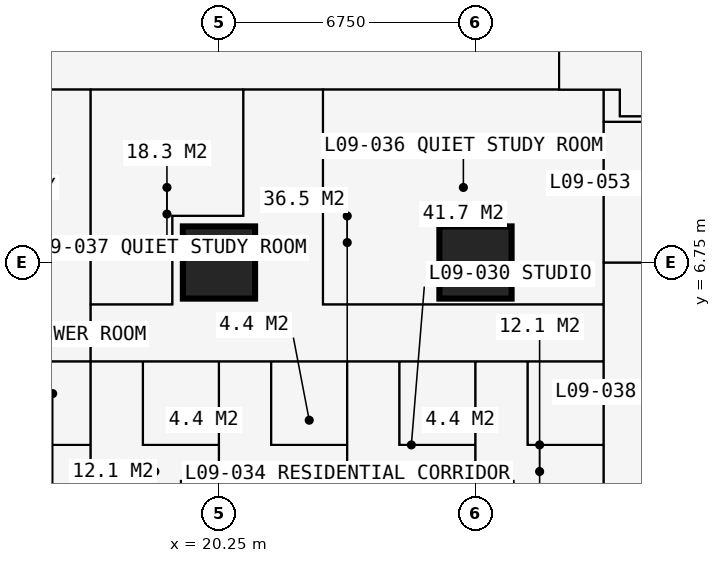
"""IFC4 building model, lengths in metres.
Left out: names, types, materials, properties, quantities, classifications, styles, units other than length and angle.
Written with IfcOpenShell. Run it as: python <this file> out.ifc"""

import sys

from ifc_helpers import new_model, si_unit, direction, frame, frame_2d, origin, origin_2d, place, context, subcontext, project, spatial, rectangle, extrude, element, fill, save


model = new_model("IFC4")
c1 = context("Model", 3, precision=1e-05, world=origin(), true_north=direction((0.0, 1.0)))
c2 = subcontext(c1, "Body", "Model", "MODEL_VIEW")
j1 = project(units=[si_unit("LENGTHUNIT", "METRE"), si_unit("PLANEANGLEUNIT", "RADIAN")], contexts=[c1])
p1 = place(None, origin())
s1 = spatial("IfcSite", under=j1, at=p1, CompositionType="ELEMENT")
p2 = place(p1, origin())
s2 = spatial("IfcBuilding", under=s1, at=p2, CompositionType="ELEMENT")
p3 = place(p2, frame((0.0, 0.0, 36.0)))
s3 = spatial("IfcBuildingStorey", under=s2, at=p3, CompositionType="ELEMENT", Elevation=36.0)
for number, where, z_axis, x_axis in (
    (1, (20.25, 6.75, 0.0), (0.0, 0.0, 1.0), (1.0, 0.0, 0.0)),
    (2, (27.0, 6.75, 0.0), (0.0, 0.0, 1.0), (1.0, 0.0, 0.0)),
):
    element("IfcColumn", number, at=place(p3, frame(where, z_axis=z_axis, x_axis=x_axis)), inside=s3, PredefinedType="COLUMN", context=c2, shape_type="SweptSolid", body=[
        extrude(rectangle(XDim=1.9, YDim=1.9, at=origin_2d()), origin(), (0.0, 0.0, 1.0), 3.6),
    ])
p4 = place(p3, frame((6.75, 4.15, 0.0), z_axis=(0.0, 0.0, 1.0), x_axis=(1.0, 0.0, 0.0)))
e3 = element("IfcWall", 3, at=p4, inside=s3, PredefinedType="PARTITIONING", context=c2, shape_type="SweptSolid", body=[
    extrude(rectangle(XDim=23.625, YDim=0.1, at=frame_2d((11.812, 0.0))), origin(), (0.0, 0.0, 1.0), 3.375),
])
p5 = place(p4, frame((0.2, 0.0, 0.0)))
e4 = element("IfcOpeningElement", 4, at=p5, cuts=e3, PredefinedType="OPENING", context=c2, shape_type="SweptSolid", body=[
    extrude(rectangle(XDim=0.95, YDim=2.2, at=frame_2d((0.475, 1.1))), frame((0.0, 0.06, 0.0), z_axis=(0.0, -1.0, 0.0), x_axis=(1.0, 0.0, 0.0)), (0.0, 0.0, 1.0), 0.12),
])
p6 = place(p4, frame((3.625, 0.0, 0.0)))
e5 = element("IfcOpeningElement", 5, at=p6, cuts=e3, PredefinedType="OPENING", context=c2, shape_type="SweptSolid", body=[
    extrude(rectangle(XDim=0.95, YDim=2.2, at=frame_2d((0.475, 1.1))), frame((0.0, 0.06, 0.0), z_axis=(0.0, -1.0, 0.0), x_axis=(1.0, 0.0, 0.0)), (0.0, 0.0, 1.0), 0.12),
])
p7 = place(p4, frame((7.0, 0.0, 0.0)))
e6 = element("IfcOpeningElement", 6, at=p7, cuts=e3, PredefinedType="OPENING", context=c2, shape_type="SweptSolid", body=[
    extrude(rectangle(XDim=0.95, YDim=2.2, at=frame_2d((0.475, 1.1))), frame((0.0, 0.06, 0.0), z_axis=(0.0, -1.0, 0.0), x_axis=(1.0, 0.0, 0.0)), (0.0, 0.0, 1.0), 0.12),
])
p8 = place(p4, frame((10.325, 0.0, 0.0)))
e7 = element("IfcOpeningElement", 7, at=p8, cuts=e3, PredefinedType="OPENING", context=c2, shape_type="SweptSolid", body=[
    extrude(rectangle(XDim=0.95, YDim=2.2, at=frame_2d((0.475, 1.1))), frame((0.0, 0.06, 0.0), z_axis=(0.0, -1.0, 0.0), x_axis=(1.0, 0.0, 0.0)), (0.0, 0.0, 1.0), 0.12),
])
p9 = place(p4, frame((13.75, 0.0, 0.0)))
e8 = element("IfcOpeningElement", 8, at=p9, cuts=e3, PredefinedType="OPENING", context=c2, shape_type="SweptSolid", body=[
    extrude(rectangle(XDim=0.95, YDim=2.2, at=frame_2d((0.475, 1.1))), frame((0.0, 0.06, 0.0), z_axis=(0.0, -1.0, 0.0), x_axis=(1.0, 0.0, 0.0)), (0.0, 0.0, 1.0), 0.12),
])
p10 = place(p4, frame((17.125, 0.0, 0.0)))
e9 = element("IfcOpeningElement", 9, at=p10, cuts=e3, PredefinedType="OPENING", context=c2, shape_type="SweptSolid", body=[
    extrude(rectangle(XDim=0.95, YDim=2.2, at=frame_2d((0.475, 1.1))), frame((0.0, 0.06, 0.0), z_axis=(0.0, -1.0, 0.0), x_axis=(1.0, 0.0, 0.0)), (0.0, 0.0, 1.0), 0.12),
])
p11 = place(p4, frame((20.5, 0.0, 0.0)))
e10 = element("IfcOpeningElement", 10, at=p11, cuts=e3, PredefinedType="OPENING", context=c2, shape_type="SweptSolid", body=[
    extrude(rectangle(XDim=0.95, YDim=2.2, at=frame_2d((0.475, 1.1))), frame((0.0, 0.06, 0.0), z_axis=(0.0, -1.0, 0.0), x_axis=(1.0, 0.0, 0.0)), (0.0, 0.0, 1.0), 0.12),
])
p12 = place(p3, frame((10.125, 11.3, 0.0), z_axis=(0.0, 0.0, 1.0), x_axis=(1.0, 0.0, 0.0)))
e11 = element("IfcWall", 11, at=p12, inside=s3, PredefinedType="PARTITIONING", context=c2, shape_type="SweptSolid", body=[
    extrude(rectangle(XDim=20.675, YDim=0.15, at=frame_2d((10.337, 0.0))), origin(), (0.0, 0.0, 1.0), 3.375),
])
p13 = place(p12, frame((5.2, 0.0, 0.0)))
e12 = element("IfcOpeningElement", 12, at=p13, cuts=e11, PredefinedType="OPENING", context=c2, shape_type="SweptSolid", body=[
    extrude(rectangle(XDim=1.0, YDim=2.2, at=frame_2d((0.5, 1.1))), frame((0.0, 0.085, 0.0), z_axis=(0.0, -1.0, 0.0), x_axis=(1.0, 0.0, 0.0)), (0.0, 0.0, 1.0), 0.17),
])
p14 = place(p12, frame((11.312, 0.0, 0.0)))
e13 = element("IfcOpeningElement", 13, at=p14, cuts=e11, PredefinedType="OPENING", context=c2, shape_type="SweptSolid", body=[
    extrude(rectangle(XDim=1.0, YDim=2.2, at=frame_2d((0.5, 1.1))), frame((0.0, 0.085, 0.0), z_axis=(0.0, -1.0, 0.0), x_axis=(1.0, 0.0, 0.0)), (0.0, 0.0, 1.0), 0.17),
])
p15 = place(p12, frame((2.425, 0.0, 0.0)))
e14 = element("IfcOpeningElement", 14, at=p15, cuts=e11, PredefinedType="OPENING", context=c2, shape_type="SweptSolid", body=[
    extrude(rectangle(XDim=0.95, YDim=2.2, at=frame_2d((0.475, 1.1))), frame((0.0, 0.085, 0.0), z_axis=(0.0, -1.0, 0.0), x_axis=(1.0, 0.0, 0.0)), (0.0, 0.0, 1.0), 0.17),
])
p16 = place(p3, frame((14.875, 1.95, 0.0), z_axis=(0.0, 0.0, 1.0), x_axis=(1.0, 0.0, 0.0)))
e15 = element("IfcWall", 15, at=p16, inside=s3, PredefinedType="PARTITIONING", context=c2, shape_type="SweptSolid", body=[
    extrude(rectangle(XDim=2.0, YDim=0.1, at=frame_2d((1.0, 0.0))), origin(), (0.0, 0.0, 1.0), 3.375),
])
p17 = place(p3, frame((16.875, -0.734, 0.0), z_axis=(0.0, 0.0, 1.0), x_axis=(0.0, 1.0, 0.0)))
e16 = element("IfcWall", 16, at=p17, inside=s3, PredefinedType="PARTITIONING", context=c2, shape_type="SweptSolid", body=[
    extrude(rectangle(XDim=12.034, YDim=0.15, at=frame_2d((6.017, 0.0))), origin(), (0.0, 0.0, 1.0), 3.375),
])
p18 = place(p3, frame((16.875, 5.65, 0.0), z_axis=(0.0, 0.0, 1.0), x_axis=(1.0, 0.0, 0.0)))
e17 = element("IfcWall", 17, at=p18, inside=s3, PredefinedType="PARTITIONING", context=c2, shape_type="SweptSolid", body=[
    extrude(rectangle(XDim=2.145, YDim=0.15, at=frame_2d((1.073, 0.0))), origin(), (0.0, 0.0, 1.0), 3.375),
])
p19 = place(p3, frame((18.25, 1.95, 0.0), z_axis=(0.0, 0.0, 1.0), x_axis=(0.0, 1.0, 0.0)))
e18 = element("IfcWall", 18, at=p19, inside=s3, PredefinedType="PARTITIONING", context=c2, shape_type="SweptSolid", body=[
    extrude(rectangle(XDim=2.2, YDim=0.1, at=frame_2d((1.1, 0.0))), origin(), (0.0, 0.0, 1.0), 3.375),
])
p20 = place(p19, frame((0.65, 0.0, 0.0)))
e19 = element("IfcOpeningElement", 19, at=p20, cuts=e18, PredefinedType="OPENING", context=c2, shape_type="SweptSolid", body=[
    extrude(rectangle(XDim=0.9, YDim=2.2, at=frame_2d((0.45, 1.1))), frame((0.0, 0.06, 0.0), z_axis=(0.0, -1.0, 0.0), x_axis=(1.0, 0.0, 0.0)), (0.0, 0.0, 1.0), 0.12),
])
p21 = place(p3, frame((18.25, 1.95, 0.0), z_axis=(0.0, 0.0, 1.0), x_axis=(1.0, 0.0, 0.0)))
e20 = element("IfcWall", 20, at=p21, inside=s3, PredefinedType="PARTITIONING", context=c2, shape_type="SweptSolid", body=[
    extrude(rectangle(XDim=2.0, YDim=0.1, at=frame_2d((1.0, 0.0))), origin(), (0.0, 0.0, 1.0), 3.375),
])
p22 = place(p3, frame((19.02, 5.65, 0.0), z_axis=(0.0, 0.0, 1.0), x_axis=(0.0, 1.0, 0.0)))
e21 = element("IfcWall", 21, at=p22, inside=s3, PredefinedType="PARTITIONING", context=c2, shape_type="SweptSolid", body=[
    extrude(rectangle(XDim=2.33, YDim=0.15, at=frame_2d((1.165, 0.0))), origin(), (0.0, 0.0, 1.0), 3.375),
])
p23 = place(p3, frame((19.02, 7.98, 0.0), z_axis=(0.0, 0.0, 1.0), x_axis=(1.0, 0.0, 0.0)))
e22 = element("IfcWall", 22, at=p23, inside=s3, PredefinedType="PARTITIONING", context=c2, shape_type="SweptSolid", body=[
    extrude(rectangle(XDim=1.867, YDim=0.15, at=frame_2d((0.934, 0.0))), origin(), (0.0, 0.0, 1.0), 3.375),
])
p24 = place(p3, frame((20.25, -0.734, 0.0), z_axis=(0.0, 0.0, 1.0), x_axis=(0.0, 1.0, 0.0)))
e23 = element("IfcWall", 23, at=p24, inside=s3, PredefinedType="PARTITIONING", context=c2, shape_type="SweptSolid", body=[
    extrude(rectangle(XDim=4.884, YDim=0.175, at=frame_2d((2.442, 0.0))), origin(), (0.0, 0.0, 1.0), 2.61),
])
p25 = place(p3, frame((20.887, 7.98, 0.0), z_axis=(0.0, 0.0, 1.0), x_axis=(0.0, 1.0, 0.0)))
e24 = element("IfcWall", 24, at=p25, inside=s3, PredefinedType="PARTITIONING", context=c2, shape_type="SweptSolid", body=[
    extrude(rectangle(XDim=3.32, YDim=0.15, at=frame_2d((1.66, 0.0))), origin(), (0.0, 0.0, 1.0), 3.375),
])
p26 = place(p25, frame((1.2, 0.0, 0.0)))
e25 = element("IfcOpeningElement", 25, at=p26, cuts=e24, PredefinedType="OPENING", context=c2, shape_type="SweptSolid", body=[
    extrude(rectangle(XDim=0.95, YDim=2.2, at=frame_2d((0.475, 1.1))), frame((0.0, 0.085, 0.0), z_axis=(0.0, -1.0, 0.0), x_axis=(1.0, 0.0, 0.0)), (0.0, 0.0, 1.0), 0.17),
])
p27 = place(p3, frame((21.625, 1.95, 0.0), z_axis=(0.0, 0.0, 1.0), x_axis=(0.0, 1.0, 0.0)))
e26 = element("IfcWall", 26, at=p27, inside=s3, PredefinedType="PARTITIONING", context=c2, shape_type="SweptSolid", body=[
    extrude(rectangle(XDim=2.2, YDim=0.1, at=frame_2d((1.1, 0.0))), origin(), (0.0, 0.0, 1.0), 3.375),
])
p28 = place(p27, frame((0.65, 0.0, 0.0)))
e27 = element("IfcOpeningElement", 27, at=p28, cuts=e26, PredefinedType="OPENING", context=c2, shape_type="SweptSolid", body=[
    extrude(rectangle(XDim=0.9, YDim=2.2, at=frame_2d((0.45, 1.1))), frame((0.0, 0.06, 0.0), z_axis=(0.0, -1.0, 0.0), x_axis=(1.0, 0.0, 0.0)), (0.0, 0.0, 1.0), 0.12),
])
p29 = place(p3, frame((21.625, 1.95, 0.0), z_axis=(0.0, 0.0, 1.0), x_axis=(1.0, 0.0, 0.0)))
e28 = element("IfcWall", 28, at=p29, inside=s3, PredefinedType="PARTITIONING", context=c2, shape_type="SweptSolid", body=[
    extrude(rectangle(XDim=2.0, YDim=0.1, at=frame_2d((1.0, 0.0))), origin(), (0.0, 0.0, 1.0), 3.375),
])
p30 = place(p3, frame((22.988, 5.65, 0.0), z_axis=(0.0, 0.0, 1.0), x_axis=(1.0, 0.0, 0.0)))
e29 = element("IfcWall", 29, at=p30, inside=s3, PredefinedType="PARTITIONING", context=c2, shape_type="SweptSolid", body=[
    extrude(rectangle(XDim=7.387, YDim=0.15, at=frame_2d((3.694, 0.0))), origin(), (0.0, 0.0, 1.0), 3.375),
])
p31 = place(p30, frame((2.1, 0.0, 0.0)))
e30 = element("IfcOpeningElement", 30, at=p31, cuts=e29, PredefinedType="OPENING", context=c2, shape_type="SweptSolid", body=[
    extrude(rectangle(XDim=0.95, YDim=2.2, at=frame_2d((0.475, 1.1))), frame((0.0, 0.085, 0.0), z_axis=(0.0, -1.0, 0.0), x_axis=(1.0, 0.0, 0.0)), (0.0, 0.0, 1.0), 0.17),
])
p32 = place(p3, frame((22.988, 5.65, 0.0), z_axis=(0.0, 0.0, 1.0), x_axis=(0.0, 1.0, 0.0)))
e31 = element("IfcWall", 31, at=p32, inside=s3, PredefinedType="PARTITIONING", context=c2, shape_type="SweptSolid", body=[
    extrude(rectangle(XDim=5.65, YDim=0.15, at=frame_2d((2.825, 0.0))), origin(), (0.0, 0.0, 1.0), 3.375),
])
p33 = place(p3, frame((23.625, -0.734, 0.0), z_axis=(0.0, 0.0, 1.0), x_axis=(0.0, 1.0, 0.0)))
e32 = element("IfcWall", 32, at=p33, inside=s3, PredefinedType="PARTITIONING", context=c2, shape_type="SweptSolid", body=[
    extrude(rectangle(XDim=4.884, YDim=0.175, at=frame_2d((2.442, 0.0))), origin(), (0.0, 0.0, 1.0), 3.375),
])
p34 = place(p3, frame((25.0, 1.95, 0.0), z_axis=(0.0, 0.0, 1.0), x_axis=(0.0, 1.0, 0.0)))
e33 = element("IfcWall", 33, at=p34, inside=s3, PredefinedType="PARTITIONING", context=c2, shape_type="SweptSolid", body=[
    extrude(rectangle(XDim=2.2, YDim=0.1, at=frame_2d((1.1, 0.0))), origin(), (0.0, 0.0, 1.0), 3.375),
])
p35 = place(p34, frame((0.65, 0.0, 0.0)))
e34 = element("IfcOpeningElement", 34, at=p35, cuts=e33, PredefinedType="OPENING", context=c2, shape_type="SweptSolid", body=[
    extrude(rectangle(XDim=0.9, YDim=2.2, at=frame_2d((0.45, 1.1))), frame((0.0, 0.06, 0.0), z_axis=(0.0, -1.0, 0.0), x_axis=(1.0, 0.0, 0.0)), (0.0, 0.0, 1.0), 0.12),
])
p36 = place(p3, frame((25.0, 1.95, 0.0), z_axis=(0.0, 0.0, 1.0), x_axis=(1.0, 0.0, 0.0)))
e35 = element("IfcWall", 35, at=p36, inside=s3, PredefinedType="PARTITIONING", context=c2, shape_type="SweptSolid", body=[
    extrude(rectangle(XDim=2.0, YDim=0.1, at=frame_2d((1.0, 0.0))), origin(), (0.0, 0.0, 1.0), 3.375),
])
p37 = place(p3, frame((27.0, -0.734, 0.0), z_axis=(0.0, 0.0, 1.0), x_axis=(0.0, 1.0, 0.0)))
e36 = element("IfcWall", 36, at=p37, inside=s3, PredefinedType="PARTITIONING", context=c2, shape_type="SweptSolid", body=[
    extrude(rectangle(XDim=4.884, YDim=0.175, at=frame_2d((2.442, 0.0))), origin(), (0.0, 0.0, 1.0), 2.877),
])
p38 = place(p3, frame((28.375, 1.95, 0.0), z_axis=(0.0, 0.0, 1.0), x_axis=(0.0, 1.0, 0.0)))
e37 = element("IfcWall", 37, at=p38, inside=s3, PredefinedType="PARTITIONING", context=c2, shape_type="SweptSolid", body=[
    extrude(rectangle(XDim=2.2, YDim=0.1, at=frame_2d((1.1, 0.0))), origin(), (0.0, 0.0, 1.0), 3.375),
])
p39 = place(p38, frame((0.65, 0.0, 0.0)))
e38 = element("IfcOpeningElement", 38, at=p39, cuts=e37, PredefinedType="OPENING", context=c2, shape_type="SweptSolid", body=[
    extrude(rectangle(XDim=0.9, YDim=2.2, at=frame_2d((0.45, 1.1))), frame((0.0, 0.06, 0.0), z_axis=(0.0, -1.0, 0.0), x_axis=(1.0, 0.0, 0.0)), (0.0, 0.0, 1.0), 0.12),
])
p40 = place(p3, frame((28.375, 1.95, 0.0), z_axis=(0.0, 0.0, 1.0), x_axis=(1.0, 0.0, 0.0)))
e39 = element("IfcWall", 39, at=p40, inside=s3, PredefinedType="PARTITIONING", context=c2, shape_type="SweptSolid", body=[
    extrude(rectangle(XDim=2.0, YDim=0.1, at=frame_2d((1.0, 0.0))), origin(), (0.0, 0.0, 1.0), 3.375),
])
p41 = place(p3, frame((29.2, 11.3, 0.0), z_axis=(0.0, 0.0, 1.0), x_axis=(0.0, 1.0, 0.0)))
e40 = element("IfcWall", 40, at=p41, inside=s3, PredefinedType="PARTITIONING", context=c2, shape_type="SweptSolid", body=[
    extrude(rectangle(XDim=17.9, YDim=0.2, at=frame_2d((8.95, 0.0))), origin(), (0.0, 0.0, 1.0), 3.375),
])
p42 = place(p41, frame((8.35, 0.0, 0.0)))
e41 = element("IfcOpeningElement", 41, at=p42, cuts=e40, PredefinedType="OPENING", context=c2, shape_type="SweptSolid", body=[
    extrude(rectangle(XDim=1.2, YDim=2.2, at=frame_2d((0.6, 1.1))), frame((0.0, 0.11, 0.0), z_axis=(0.0, -1.0, 0.0), x_axis=(1.0, 0.0, 0.0)), (0.0, 0.0, 1.0), 0.22),
])
p43 = place(p3, frame((30.375, -0.734, 0.0), z_axis=(0.0, 0.0, 1.0), x_axis=(0.0, 1.0, 0.0)))
e42 = element("IfcWall", 42, at=p43, inside=s3, PredefinedType="PARTITIONING", context=c2, shape_type="SweptSolid", body=[
    extrude(rectangle(XDim=12.034, YDim=0.15, at=frame_2d((6.017, 0.0))), origin(), (0.0, 0.0, 1.0), 3.375),
])
p44 = place(p43, frame((5.134, 0.0, 0.0)))
e43 = element("IfcOpeningElement", 43, at=p44, cuts=e42, PredefinedType="OPENING", context=c2, shape_type="SweptSolid", body=[
    extrude(rectangle(XDim=1.0, YDim=2.2, at=frame_2d((0.5, 1.1))), frame((0.0, 0.085, 0.0), z_axis=(0.0, -1.0, 0.0), x_axis=(1.0, 0.0, 0.0)), (0.0, 0.0, 1.0), 0.17),
])
p45 = place(p3, frame((30.375, 6.75, 0.0), z_axis=(0.0, 0.0, 1.0), x_axis=(1.0, 0.0, 0.0)))
e44 = element("IfcWall", 44, at=p45, inside=s3, PredefinedType="PARTITIONING", context=c2, shape_type="SweptSolid", body=[
    extrude(rectangle(XDim=5.975, YDim=0.15, at=frame_2d((2.988, 0.0))), origin(), (0.0, 0.0, 1.0), 2.877),
])
p46 = place(p3, frame((30.375, 10.45, 0.0), z_axis=(0.0, 0.0, 1.0), x_axis=(1.0, 0.0, 0.0)))
e45 = element("IfcWall", 45, at=p46, inside=s3, PredefinedType="PARTITIONING", context=c2, shape_type="SweptSolid", body=[
    extrude(rectangle(XDim=4.475, YDim=0.15, at=frame_2d((2.238, 0.0))), origin(), (0.0, 0.0, 1.0), 3.375),
])
p47 = place(p46, frame((2.35, 0.0, 0.0)))
e46 = element("IfcOpeningElement", 46, at=p47, cuts=e45, PredefinedType="OPENING", context=c2, shape_type="SweptSolid", body=[
    extrude(rectangle(XDim=0.95, YDim=2.2, at=frame_2d((0.475, 1.1))), frame((0.0, 0.085, 0.0), z_axis=(0.0, -1.0, 0.0), x_axis=(1.0, 0.0, 0.0)), (0.0, 0.0, 1.0), 0.17),
])
p48 = place(p3, frame((30.8, 10.6, 0.0), z_axis=(0.0, 0.0, 1.0), x_axis=(0.0, 1.0, 0.0)))
e47 = element("IfcWall", 47, at=p48, inside=s3, PredefinedType="PARTITIONING", context=c2, shape_type="SweptSolid", body=[
    extrude(rectangle(XDim=0.7, YDim=0.15, at=frame_2d((0.35, 0.0))), origin(), (0.0, 0.0, 1.0), 3.375),
])
p49 = place(p3, frame((30.8, 10.6, 0.0), z_axis=(0.0, 0.0, 1.0), x_axis=(1.0, 0.0, 0.0)))
e48 = element("IfcWall", 48, at=p49, inside=s3, PredefinedType="PARTITIONING", context=c2, shape_type="SweptSolid", body=[
    extrude(rectangle(XDim=1.85, YDim=0.15, at=frame_2d((0.925, 0.0))), origin(), (0.0, 0.0, 1.0), 3.375),
])
p50 = place(p13, origin())
e49 = element("IfcDoor", 49, at=p50, inside=s3, OperationType="SINGLE_SWING_LEFT", PredefinedType="DOOR", context=c2, shape_type="SweptSolid", body=[
    extrude(rectangle(XDim=1.0, YDim=2.2, at=frame_2d((0.5, 1.1))), frame((0.0, 0.025, 0.0), z_axis=(0.0, -1.0, 0.0), x_axis=(1.0, 0.0, 0.0)), (0.0, 0.0, 1.0), 0.05),
])
fill(e12, e49)
p51 = place(p8, origin())
e50 = element("IfcDoor", 50, at=p51, inside=s3, OperationType="SINGLE_SWING_LEFT", PredefinedType="DOOR", context=c2, shape_type="SweptSolid", body=[
    extrude(rectangle(XDim=0.95, YDim=2.2, at=frame_2d((0.475, 1.1))), frame((0.0, 0.025, 0.0), z_axis=(0.0, -1.0, 0.0), x_axis=(1.0, 0.0, 0.0)), (0.0, 0.0, 1.0), 0.05),
])
fill(e7, e50)
p52 = place(p20, origin())
e51 = element("IfcDoor", 51, at=p52, inside=s3, OperationType="SINGLE_SWING_RIGHT", PredefinedType="DOOR", context=c2, shape_type="SweptSolid", body=[
    extrude(rectangle(XDim=0.9, YDim=2.2, at=frame_2d((0.45, 1.1))), frame((0.0, 0.025, 0.0), z_axis=(0.0, -1.0, 0.0), x_axis=(1.0, 0.0, 0.0)), (0.0, 0.0, 1.0), 0.05),
])
fill(e19, e51)
p53 = place(p9, origin())
e52 = element("IfcDoor", 52, at=p53, inside=s3, OperationType="SINGLE_SWING_LEFT", PredefinedType="DOOR", context=c2, shape_type="SweptSolid", body=[
    extrude(rectangle(XDim=0.95, YDim=2.2, at=frame_2d((0.475, 1.1))), frame((0.0, 0.025, 0.0), z_axis=(0.0, -1.0, 0.0), x_axis=(1.0, 0.0, 0.0)), (0.0, 0.0, 1.0), 0.05),
])
fill(e8, e52)
p54 = place(p28, origin())
e53 = element("IfcDoor", 53, at=p54, inside=s3, OperationType="SINGLE_SWING_RIGHT", PredefinedType="DOOR", context=c2, shape_type="SweptSolid", body=[
    extrude(rectangle(XDim=0.9, YDim=2.2, at=frame_2d((0.45, 1.1))), frame((0.0, 0.025, 0.0), z_axis=(0.0, -1.0, 0.0), x_axis=(1.0, 0.0, 0.0)), (0.0, 0.0, 1.0), 0.05),
])
fill(e27, e53)
p55 = place(p10, origin())
e54 = element("IfcDoor", 54, at=p55, inside=s3, OperationType="SINGLE_SWING_LEFT", PredefinedType="DOOR", context=c2, shape_type="SweptSolid", body=[
    extrude(rectangle(XDim=0.95, YDim=2.2, at=frame_2d((0.475, 1.1))), frame((0.0, 0.025, 0.0), z_axis=(0.0, -1.0, 0.0), x_axis=(1.0, 0.0, 0.0)), (0.0, 0.0, 1.0), 0.05),
])
fill(e9, e54)
p56 = place(p35, origin())
e55 = element("IfcDoor", 55, at=p56, inside=s3, OperationType="SINGLE_SWING_RIGHT", PredefinedType="DOOR", context=c2, shape_type="SweptSolid", body=[
    extrude(rectangle(XDim=0.9, YDim=2.2, at=frame_2d((0.45, 1.1))), frame((0.0, 0.025, 0.0), z_axis=(0.0, -1.0, 0.0), x_axis=(1.0, 0.0, 0.0)), (0.0, 0.0, 1.0), 0.05),
])
fill(e34, e55)
p57 = place(p11, origin())
e56 = element("IfcDoor", 56, at=p57, inside=s3, OperationType="SINGLE_SWING_LEFT", PredefinedType="DOOR", context=c2, shape_type="SweptSolid", body=[
    extrude(rectangle(XDim=0.95, YDim=2.2, at=frame_2d((0.475, 1.1))), frame((0.0, 0.025, 0.0), z_axis=(0.0, -1.0, 0.0), x_axis=(1.0, 0.0, 0.0)), (0.0, 0.0, 1.0), 0.05),
])
fill(e10, e56)
p58 = place(p39, origin())
e57 = element("IfcDoor", 57, at=p58, inside=s3, OperationType="SINGLE_SWING_RIGHT", PredefinedType="DOOR", context=c2, shape_type="SweptSolid", body=[
    extrude(rectangle(XDim=0.9, YDim=2.2, at=frame_2d((0.45, 1.1))), frame((0.0, 0.025, 0.0), z_axis=(0.0, -1.0, 0.0), x_axis=(1.0, 0.0, 0.0)), (0.0, 0.0, 1.0), 0.05),
])
fill(e38, e57)
p59 = place(p14, origin())
e58 = element("IfcDoor", 58, at=p59, inside=s3, OperationType="SINGLE_SWING_LEFT", PredefinedType="DOOR", context=c2, shape_type="SweptSolid", body=[
    extrude(rectangle(XDim=1.0, YDim=2.2, at=frame_2d((0.5, 1.1))), frame((0.0, 0.025, 0.0), z_axis=(0.0, -1.0, 0.0), x_axis=(1.0, 0.0, 0.0)), (0.0, 0.0, 1.0), 0.05),
])
fill(e13, e58)
p60 = place(p31, origin())
e59 = element("IfcDoor", 59, at=p60, inside=s3, OperationType="SINGLE_SWING_LEFT", PredefinedType="DOOR", context=c2, shape_type="SweptSolid", body=[
    extrude(rectangle(XDim=0.95, YDim=2.2, at=frame_2d((0.475, 1.1))), frame((0.0, 0.025, 0.0), z_axis=(0.0, -1.0, 0.0), x_axis=(1.0, 0.0, 0.0)), (0.0, 0.0, 1.0), 0.05),
])
fill(e30, e59)
p61 = place(p26, origin())
e60 = element("IfcDoor", 60, at=p61, inside=s3, OperationType="SINGLE_SWING_LEFT", PredefinedType="DOOR", context=c2, shape_type="SweptSolid", body=[
    extrude(rectangle(XDim=0.95, YDim=2.2, at=frame_2d((0.475, 1.1))), frame((0.0, 0.025, 0.0), z_axis=(0.0, -1.0, 0.0), x_axis=(1.0, 0.0, 0.0)), (0.0, 0.0, 1.0), 0.05),
])
fill(e25, e60)
p62 = place(p44, origin())
e61 = element("IfcDoor", 61, at=p62, inside=s3, OperationType="SINGLE_SWING_LEFT", PredefinedType="DOOR", context=c2, shape_type="SweptSolid", body=[
    extrude(rectangle(XDim=1.0, YDim=2.2, at=frame_2d((0.5, 1.1))), frame((0.0, 0.025, 0.0), z_axis=(0.0, -1.0, 0.0), x_axis=(1.0, 0.0, 0.0)), (0.0, 0.0, 1.0), 0.05),
])
fill(e43, e61)
save(model, sys.argv[1])
